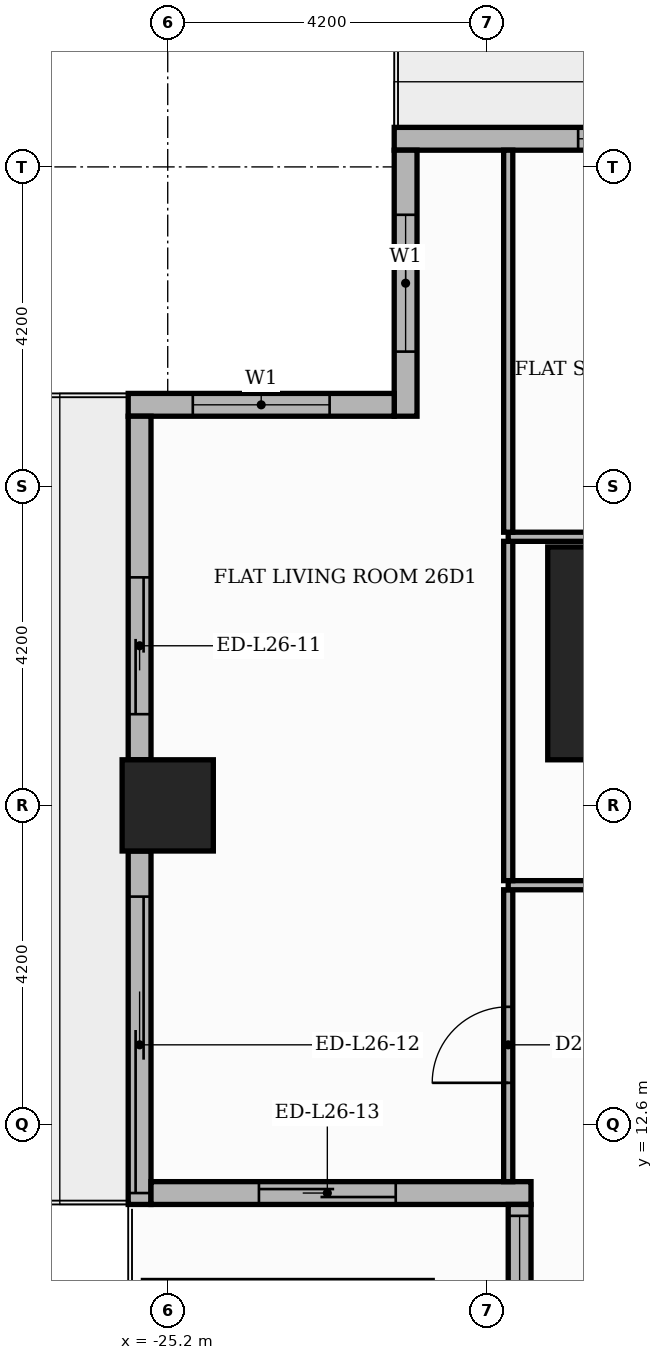
"""IFC4 building model, lengths in metres.
Left out: names, types, materials, properties, quantities, classifications, styles, units other than length and angle.
Written with IfcOpenShell. Run it as: python <this file> out.ifc"""

import sys

from ifc_helpers import new_model, si_unit, direction, frame, frame_2d, origin, origin_2d, place, context, subcontext, project, spatial, rectangle, extrude, element, fill, save


model = new_model("IFC4")
c1 = context("Model", 3, precision=1e-05, world=origin(), true_north=direction((0.0, 1.0)))
c2 = subcontext(c1, "Body", "Model", "MODEL_VIEW")
j1 = project(units=[si_unit("LENGTHUNIT", "METRE"), si_unit("PLANEANGLEUNIT", "RADIAN")], contexts=[c1])
p1 = place(None, origin())
s1 = spatial("IfcSite", under=j1, at=p1, CompositionType="ELEMENT")
p2 = place(p1, origin())
s2 = spatial("IfcBuilding", under=s1, at=p2, CompositionType="ELEMENT")
p3 = place(p2, frame((0.0, 0.0, 110.4)))
s3 = spatial("IfcBuildingStorey", under=s2, at=p3, CompositionType="ELEMENT", Elevation=110.4)
p4 = place(p3, frame((-18.8, 18.8, 0.0), z_axis=(0.0, 0.0, 1.0), x_axis=(1.0, 0.0, 0.0)))
e1 = element("IfcColumn", 1, at=p4, inside=s3, PredefinedType="COLUMN", context=c2, shape_type="SweptSolid", body=[
    extrude(rectangle(XDim=2.8, YDim=2.8, at=origin_2d()), origin(), (0.0, 0.0, 1.0), 3.9),
])
p5 = place(p3, frame((-25.2, 16.8, 0.0), z_axis=(0.0, 0.0, 1.0), x_axis=(1.0, 0.0, 0.0)))
e2 = element("IfcColumn", 2, at=p5, inside=s3, PredefinedType="COLUMN", context=c2, shape_type="SweptSolid", body=[
    extrude(rectangle(XDim=1.2, YDim=1.2, at=origin_2d()), origin(), (0.0, 0.0, 1.0), 3.9),
])
p6 = place(p3, frame((-17.4, 25.57, 0.0), z_axis=(0.0, 0.0, 1.0), x_axis=(-1.0, 0.0, 0.0)))
e3 = element("IfcWall", 3, at=p6, inside=s3, PredefinedType="STANDARD", context=c2, shape_type="SweptSolid", body=[
    extrude(rectangle(XDim=4.82, YDim=0.3, at=frame_2d((2.41, 0.0))), origin(), (0.0, 0.0, 1.0), 3.48),
])
p7 = place(p6, frame((0.6, 0.0, 0.9)))
e4 = element("IfcOpeningElement", 4, at=p7, cuts=e3, PredefinedType="OPENING", context=c2, shape_type="SweptSolid", body=[
    extrude(rectangle(XDim=1.8, YDim=2.1, at=frame_2d((0.9, 1.05))), frame((0.0, 0.16, 0.0), z_axis=(0.0, -1.0, 0.0), x_axis=(1.0, 0.0, 0.0)), (0.0, 0.0, 1.0), 0.32),
])
p8 = place(p3, frame((-22.07, 25.42, 0.0), z_axis=(0.0, 0.0, 1.0), x_axis=(0.0, -1.0, 0.0)))
e5 = element("IfcWall", 5, at=p8, inside=s3, PredefinedType="STANDARD", context=c2, shape_type="SweptSolid", body=[
    extrude(rectangle(XDim=3.5, YDim=0.3, at=frame_2d((1.75, 0.0))), origin(), (0.0, 0.0, 1.0), 3.48),
])
p9 = place(p8, frame((0.85, 0.0, 0.9)))
e6 = element("IfcOpeningElement", 6, at=p9, cuts=e5, PredefinedType="OPENING", context=c2, shape_type="SweptSolid", body=[
    extrude(rectangle(XDim=1.8, YDim=2.1, at=frame_2d((0.9, 1.05))), frame((0.0, 0.16, 0.0), z_axis=(0.0, -1.0, 0.0), x_axis=(1.0, 0.0, 0.0)), (0.0, 0.0, 1.0), 0.32),
])
p10 = place(p3, frame((-22.22, 22.07, 0.0), z_axis=(0.0, 0.0, 1.0), x_axis=(-1.0, 0.0, 0.0)))
e7 = element("IfcWall", 7, at=p10, inside=s3, PredefinedType="STANDARD", context=c2, shape_type="SweptSolid", body=[
    extrude(rectangle(XDim=3.5, YDim=0.3, at=frame_2d((1.75, 0.0))), origin(), (0.0, 0.0, 1.0), 3.48),
])
p11 = place(p10, frame((0.85, 0.0, 0.9)))
e8 = element("IfcOpeningElement", 8, at=p11, cuts=e7, PredefinedType="OPENING", context=c2, shape_type="SweptSolid", body=[
    extrude(rectangle(XDim=1.8, YDim=2.1, at=frame_2d((0.9, 1.05))), frame((0.0, 0.16, 0.0), z_axis=(0.0, -1.0, 0.0), x_axis=(1.0, 0.0, 0.0)), (0.0, 0.0, 1.0), 0.32),
])
p12 = place(p3, frame((-25.57, 21.92, 0.0), z_axis=(0.0, 0.0, 1.0), x_axis=(0.0, -1.0, 0.0)))
e9 = element("IfcWall", 9, at=p12, inside=s3, PredefinedType="STANDARD", context=c2, shape_type="SweptSolid", body=[
    extrude(rectangle(XDim=4.52, YDim=0.3, at=frame_2d((2.26, 0.0))), origin(), (0.0, 0.0, 1.0), 3.48),
])
p13 = place(p12, frame((2.12, 0.0, 0.0)))
e10 = element("IfcOpeningElement", 10, at=p13, cuts=e9, PredefinedType="OPENING", context=c2, shape_type="SweptSolid", body=[
    extrude(rectangle(XDim=1.8, YDim=2.4, at=frame_2d((0.9, 1.2))), frame((0.0, 0.16, 0.0), z_axis=(0.0, -1.0, 0.0), x_axis=(1.0, 0.0, 0.0)), (0.0, 0.0, 1.0), 0.32),
])
p14 = place(p3, frame((-25.57, 16.2, 0.0), z_axis=(0.0, 0.0, 1.0), x_axis=(0.0, -1.0, 0.0)))
e11 = element("IfcWall", 11, at=p14, inside=s3, PredefinedType="STANDARD", context=c2, shape_type="SweptSolid", body=[
    extrude(rectangle(XDim=4.65, YDim=0.3, at=frame_2d((2.325, 0.0))), origin(), (0.0, 0.0, 1.0), 3.48),
])
p15 = place(p14, frame((0.6, 0.0, 0.0)))
e12 = element("IfcOpeningElement", 12, at=p15, cuts=e11, PredefinedType="OPENING", context=c2, shape_type="SweptSolid", body=[
    extrude(rectangle(XDim=3.9, YDim=2.4, at=frame_2d((1.95, 1.2))), frame((0.0, 0.16, 0.0), z_axis=(0.0, -1.0, 0.0), x_axis=(1.0, 0.0, 0.0)), (0.0, 0.0, 1.0), 0.32),
])
p16 = place(p3, frame((-25.42, 11.7, 0.0), z_axis=(0.0, 0.0, 1.0), x_axis=(1.0, 0.0, 0.0)))
e13 = element("IfcWall", 13, at=p16, inside=s3, PredefinedType="STANDARD", context=c2, shape_type="SweptSolid", body=[
    extrude(rectangle(XDim=5.0, YDim=0.3, at=frame_2d((2.5, 0.0))), origin(), (0.0, 0.0, 1.0), 3.48),
])
p17 = place(p16, frame((1.42, 0.0, 0.0)))
e14 = element("IfcOpeningElement", 14, at=p17, cuts=e13, PredefinedType="OPENING", context=c2, shape_type="SweptSolid", body=[
    extrude(rectangle(XDim=1.8, YDim=2.4, at=frame_2d((0.9, 1.2))), frame((0.0, 0.16, 0.0), z_axis=(0.0, -1.0, 0.0), x_axis=(1.0, 0.0, 0.0)), (0.0, 0.0, 1.0), 0.32),
])
p18 = place(p3, frame((-20.57, 11.55, 0.0), z_axis=(0.0, 0.0, 1.0), x_axis=(0.0, -1.0, 0.0)))
e15 = element("IfcWall", 15, at=p18, inside=s3, PredefinedType="STANDARD", context=c2, shape_type="SweptSolid", body=[
    extrude(rectangle(XDim=23.4, YDim=0.3, at=frame_2d((11.7, 0.0))), origin(), (0.0, 0.0, 1.0), 3.48),
])
p19 = place(p18, frame((0.15, 0.0, 0.9)))
e16 = element("IfcOpeningElement", 16, at=p19, cuts=e15, PredefinedType="OPENING", context=c2, shape_type="SweptSolid", body=[
    extrude(rectangle(XDim=6.0, YDim=2.1, at=frame_2d((3.0, 1.05))), frame((0.0, 0.16, 0.0), z_axis=(0.0, -1.0, 0.0), x_axis=(1.0, 0.0, 0.0)), (0.0, 0.0, 1.0), 0.32),
])
p20 = place(p18, frame((6.45, 0.0, 0.9)))
e17 = element("IfcOpeningElement", 17, at=p20, cuts=e15, PredefinedType="OPENING", context=c2, shape_type="SweptSolid", body=[
    extrude(rectangle(XDim=6.0, YDim=2.1, at=frame_2d((3.0, 1.05))), frame((0.0, 0.16, 0.0), z_axis=(0.0, -1.0, 0.0), x_axis=(1.0, 0.0, 0.0)), (0.0, 0.0, 1.0), 0.32),
])
p21 = place(p18, frame((12.75, 0.0, 0.9)))
e18 = element("IfcOpeningElement", 18, at=p21, cuts=e15, PredefinedType="OPENING", context=c2, shape_type="SweptSolid", body=[
    extrude(rectangle(XDim=6.0, YDim=2.1, at=frame_2d((3.0, 1.05))), frame((0.0, 0.16, 0.0), z_axis=(0.0, -1.0, 0.0), x_axis=(1.0, 0.0, 0.0)), (0.0, 0.0, 1.0), 0.32),
])
p22 = place(p18, frame((19.05, 0.0, 0.9)))
e19 = element("IfcOpeningElement", 19, at=p22, cuts=e15, PredefinedType="OPENING", context=c2, shape_type="SweptSolid", body=[
    extrude(rectangle(XDim=3.9, YDim=2.1, at=frame_2d((1.95, 1.05))), frame((0.0, 0.16, 0.0), z_axis=(0.0, -1.0, 0.0), x_axis=(1.0, 0.0, 0.0)), (0.0, 0.0, 1.0), 0.32),
])
p23 = place(p3, frame((-20.72, 11.85, 0.0), z_axis=(0.0, 0.0, 1.0), x_axis=(0.0, 1.0, 0.0)))
e20 = element("IfcWall", 20, at=p23, inside=s3, PredefinedType="PARTITIONING", context=c2, shape_type="SweptSolid", body=[
    extrude(rectangle(XDim=3.84, YDim=0.12, at=frame_2d((1.92, 0.0))), origin(), (0.0, 0.0, 1.0), 3.48),
])
p24 = place(p23, frame((1.3, 0.0, 0.0)))
e21 = element("IfcOpeningElement", 21, at=p24, cuts=e20, PredefinedType="OPENING", context=c2, shape_type="SweptSolid", body=[
    extrude(rectangle(XDim=1.0, YDim=2.1, at=frame_2d((0.5, 1.05))), frame((0.0, 0.07, 0.0), z_axis=(0.0, -1.0, 0.0), x_axis=(1.0, 0.0, 0.0)), (0.0, 0.0, 1.0), 0.14),
])
p25 = place(p3, frame((-20.72, 15.75, 0.0), z_axis=(0.0, 0.0, 1.0), x_axis=(1.0, 0.0, 0.0)))
e22 = element("IfcWall", 22, at=p25, inside=s3, PredefinedType="PARTITIONING", context=c2, shape_type="SweptSolid", body=[
    extrude(rectangle(XDim=6.97, YDim=0.12, at=frame_2d((3.485, 0.0))), origin(), (0.0, 0.0, 1.0), 3.48),
])
p26 = place(p25, frame((3.035, 0.0, 0.0)))
e23 = element("IfcOpeningElement", 23, at=p26, cuts=e22, PredefinedType="OPENING", context=c2, shape_type="SweptSolid", body=[
    extrude(rectangle(XDim=1.0, YDim=2.1, at=frame_2d((0.5, 1.05))), frame((0.0, 0.07, 0.0), z_axis=(0.0, -1.0, 0.0), x_axis=(1.0, 0.0, 0.0)), (0.0, 0.0, 1.0), 0.14),
])
p27 = place(p3, frame((-20.72, 15.81, 0.0), z_axis=(0.0, 0.0, 1.0), x_axis=(0.0, 1.0, 0.0)))
e24 = element("IfcWall", 24, at=p27, inside=s3, PredefinedType="PARTITIONING", context=c2, shape_type="SweptSolid", body=[
    extrude(rectangle(XDim=4.464, YDim=0.12, at=frame_2d((2.232, 0.0))), origin(), (0.0, 0.0, 1.0), 3.48),
])
p28 = place(p3, frame((-20.72, 20.334, 0.0), z_axis=(0.0, 0.0, 1.0), x_axis=(1.0, 0.0, 0.0)))
e25 = element("IfcWall", 25, at=p28, inside=s3, PredefinedType="PARTITIONING", context=c2, shape_type="SweptSolid", body=[
    extrude(rectangle(XDim=6.97, YDim=0.12, at=frame_2d((3.485, 0.0))), origin(), (0.0, 0.0, 1.0), 3.48),
])
p29 = place(p28, frame((4.853, 0.0, 0.0)))
e26 = element("IfcOpeningElement", 26, at=p29, cuts=e25, PredefinedType="OPENING", context=c2, shape_type="SweptSolid", body=[
    extrude(rectangle(XDim=0.9, YDim=2.1, at=frame_2d((0.45, 1.05))), frame((0.0, 0.07, 0.0), z_axis=(0.0, -1.0, 0.0), x_axis=(1.0, 0.0, 0.0)), (0.0, 0.0, 1.0), 0.14),
])
p30 = place(p3, frame((-20.72, 20.394, 0.0), z_axis=(0.0, 0.0, 1.0), x_axis=(0.0, 1.0, 0.0)))
e27 = element("IfcWall", 27, at=p30, inside=s3, PredefinedType="PARTITIONING", context=c2, shape_type="SweptSolid", body=[
    extrude(rectangle(XDim=5.026, YDim=0.12, at=frame_2d((2.513, 0.0))), origin(), (0.0, 0.0, 1.0), 3.48),
])
p31 = place(p7, origin())
e28 = element("IfcWindow", 28, at=p31, inside=s3, PartitioningType="SINGLE_PANEL", PredefinedType="WINDOW", context=c2, shape_type="SweptSolid", body=[
    extrude(rectangle(XDim=1.8, YDim=2.1, at=frame_2d((0.9, 1.05))), frame((0.0, 0.03, 0.0), z_axis=(0.0, -1.0, 0.0), x_axis=(1.0, 0.0, 0.0)), (0.0, 0.0, 1.0), 0.06),
])
fill(e4, e28)
p32 = place(p9, origin())
e29 = element("IfcWindow", 29, at=p32, inside=s3, PartitioningType="SINGLE_PANEL", PredefinedType="WINDOW", context=c2, shape_type="SweptSolid", body=[
    extrude(rectangle(XDim=1.8, YDim=2.1, at=frame_2d((0.9, 1.05))), frame((0.0, 0.03, 0.0), z_axis=(0.0, -1.0, 0.0), x_axis=(1.0, 0.0, 0.0)), (0.0, 0.0, 1.0), 0.06),
])
fill(e6, e29)
p33 = place(p11, origin())
e30 = element("IfcWindow", 30, at=p33, inside=s3, PartitioningType="SINGLE_PANEL", PredefinedType="WINDOW", context=c2, shape_type="SweptSolid", body=[
    extrude(rectangle(XDim=1.8, YDim=2.1, at=frame_2d((0.9, 1.05))), frame((0.0, 0.03, 0.0), z_axis=(0.0, -1.0, 0.0), x_axis=(1.0, 0.0, 0.0)), (0.0, 0.0, 1.0), 0.06),
])
fill(e8, e30)
p34 = place(p13, origin())
e31 = element("IfcDoor", 31, at=p34, inside=s3, OperationType="SLIDING_TO_RIGHT", PredefinedType="DOOR", context=c2, shape_type="SweptSolid", body=[
    extrude(rectangle(XDim=1.8, YDim=2.4, at=frame_2d((0.9, 1.2))), frame((0.0, 0.025, 0.0), z_axis=(0.0, -1.0, 0.0), x_axis=(1.0, 0.0, 0.0)), (0.0, 0.0, 1.0), 0.05),
])
fill(e10, e31)
p35 = place(p15, origin())
e32 = element("IfcDoor", 32, at=p35, inside=s3, OperationType="SLIDING_TO_LEFT", PredefinedType="DOOR", context=c2, shape_type="SweptSolid", body=[
    extrude(rectangle(XDim=3.9, YDim=2.4, at=frame_2d((1.95, 1.2))), frame((0.0, 0.025, 0.0), z_axis=(0.0, -1.0, 0.0), x_axis=(1.0, 0.0, 0.0)), (0.0, 0.0, 1.0), 0.05),
])
fill(e12, e32)
p36 = place(p17, origin())
e33 = element("IfcDoor", 33, at=p36, inside=s3, OperationType="SLIDING_TO_LEFT", PredefinedType="DOOR", context=c2, shape_type="SweptSolid", body=[
    extrude(rectangle(XDim=1.8, YDim=2.4, at=frame_2d((0.9, 1.2))), frame((0.0, 0.025, 0.0), z_axis=(0.0, -1.0, 0.0), x_axis=(1.0, 0.0, 0.0)), (0.0, 0.0, 1.0), 0.05),
])
fill(e14, e33)
p37 = place(p19, origin())
e34 = element("IfcWindow", 34, at=p37, inside=s3, PartitioningType="SINGLE_PANEL", PredefinedType="WINDOW", context=c2, shape_type="SweptSolid", body=[
    extrude(rectangle(XDim=6.0, YDim=2.1, at=frame_2d((3.0, 1.05))), frame((0.0, 0.03, 0.0), z_axis=(0.0, -1.0, 0.0), x_axis=(1.0, 0.0, 0.0)), (0.0, 0.0, 1.0), 0.06),
])
fill(e16, e34)
p38 = place(p24, origin())
e35 = element("IfcDoor", 35, at=p38, inside=s3, OperationType="SINGLE_SWING_LEFT", PredefinedType="DOOR", context=c2, shape_type="SweptSolid", body=[
    extrude(rectangle(XDim=1.0, YDim=2.1, at=frame_2d((0.5, 1.05))), frame((0.0, 0.025, 0.0), z_axis=(0.0, -1.0, 0.0), x_axis=(1.0, 0.0, 0.0)), (0.0, 0.0, 1.0), 0.05),
])
fill(e21, e35)
save(model, sys.argv[1])
